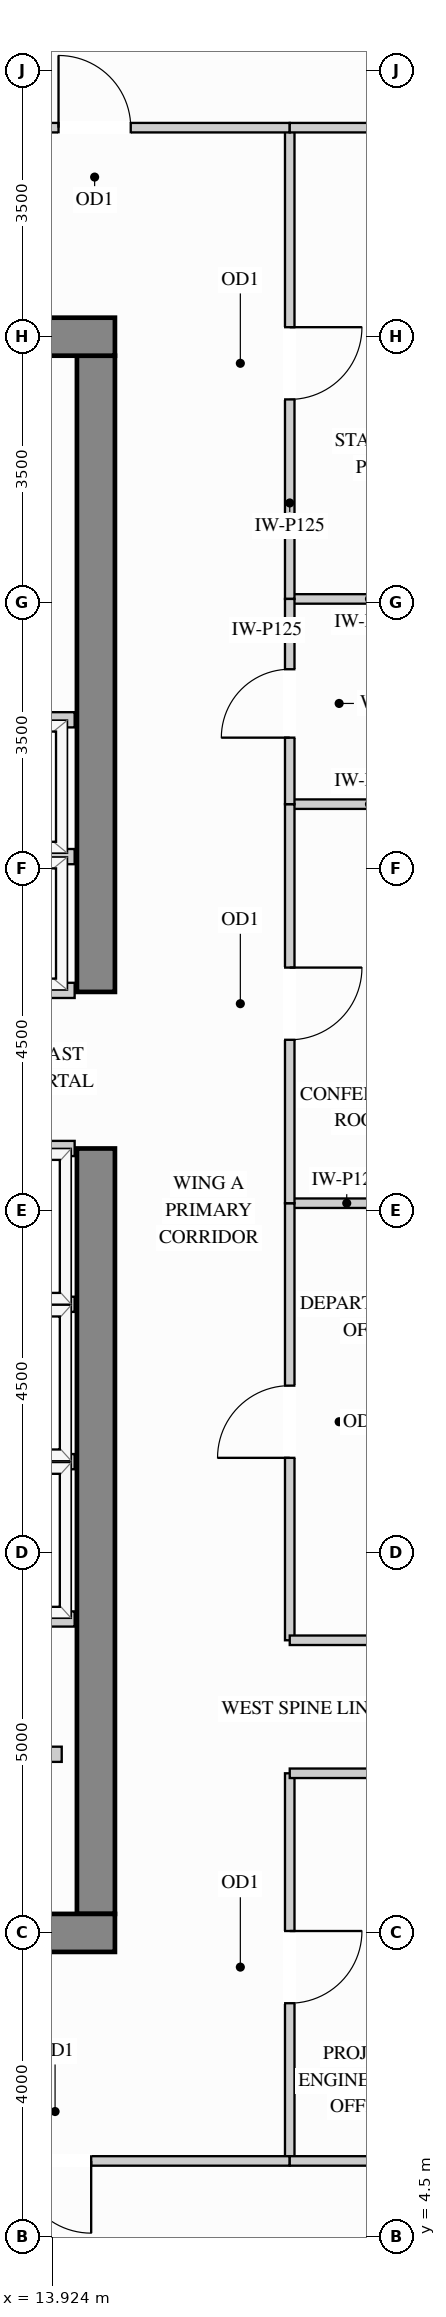
"""IFC4 building model, lengths in metres.
Left out: names, types, materials, properties, quantities, classifications, styles, units other than length and angle.
Written with IfcOpenShell. Run it as: python <this file> out.ifc"""

import sys

from ifc_helpers import new_model, si_unit, direction, frame, frame_2d, origin, place, context, subcontext, project, spatial, rectangle, extrude, source, transform, mapped, element, fill, save


model = new_model("IFC4")
c1 = context("Model", 3, precision=1e-05, world=origin(), true_north=direction((0.0, 1.0)))
c2 = subcontext(c1, "Body", "Model", "MODEL_VIEW")
j1 = project(units=[si_unit("LENGTHUNIT", "METRE"), si_unit("PLANEANGLEUNIT", "RADIAN")], contexts=[c1])
p1 = place(None, origin())
s1 = spatial("IfcSite", under=j1, at=p1, CompositionType="ELEMENT")
p2 = place(p1, origin())
s2 = spatial("IfcBuilding", under=s1, at=p2, CompositionType="ELEMENT")
p3 = place(p2, frame((0.0, 0.0, 216.0)))
s3 = spatial("IfcBuildingStorey", under=s2, at=p3, CompositionType="ELEMENT", Elevation=216.0)
m1 = source(origin(), c2, "Body", "SweptSolid", [
    extrude(rectangle(XDim=10.07, YDim=0.5, at=frame_2d((5.035, 0.0))), origin(), (0.0, 0.0, 1.0), 3.4),
])
p4 = place(p3, frame((14.5, 8.75, 0.0), z_axis=(0.0, 0.0, 1.0), x_axis=(0.0, 1.0, 0.0)))
e1 = element("IfcWall", 1, at=p4, inside=s3, PredefinedType="SHEAR", context=c2, shape_type="MappedRepresentation", body=[
    mapped(m1, transform((0.0, 0.0, 0.0), x_axis=(1.0, 0.0, 0.0), y_axis=(0.0, 1.0, 0.0), z_axis=(0.0, 0.0, 1.0))),
])
m2 = source(origin(), c2, "Body", "SweptSolid", [
    extrude(rectangle(XDim=8.37, YDim=0.5, at=frame_2d((4.185, 0.0))), origin(), (0.0, 0.0, 1.0), 3.4),
])
p5 = place(p3, frame((14.5, 20.88, 0.0), z_axis=(0.0, 0.0, 1.0), x_axis=(0.0, 1.0, 0.0)))
e2 = element("IfcWall", 2, at=p5, inside=s3, PredefinedType="SHEAR", context=c2, shape_type="MappedRepresentation", body=[
    mapped(m2, transform((0.0, 0.0, 0.0), x_axis=(1.0, 0.0, 0.0), y_axis=(0.0, 1.0, 0.0), z_axis=(0.0, 0.0, 1.0))),
])
m3 = source(origin(), c2, "Body", "SweptSolid", [
    extrude(rectangle(XDim=10.5, YDim=0.5, at=frame_2d((5.25, 0.0))), origin(), (0.0, 0.0, 1.0), 3.4),
])
for number, where, z_axis, x_axis in (
    (3, (4.25, 29.5, 0.0), (0.0, 0.0, 1.0), (1.0, 0.0, 0.0)),
    (4, (4.25, 8.5, 0.0), (0.0, 0.0, 1.0), (1.0, 0.0, 0.0)),
):
    element("IfcWall", number, at=place(p3, frame(where, z_axis=z_axis, x_axis=x_axis)), inside=s3, PredefinedType="SHEAR", context=c2, shape_type="MappedRepresentation", body=[
        mapped(m3, transform((0.0, 0.0, 0.0), x_axis=(1.0, 0.0, 0.0), y_axis=(0.0, 1.0, 0.0), z_axis=(0.0, 0.0, 1.0))),
    ])
m4 = source(origin(), c2, "Body", "SweptSolid", [
    extrude(rectangle(XDim=1.5, YDim=0.125, at=frame_2d((0.75, 0.0))), origin(), (0.0, 0.0, 1.0), 2.773),
])
p6 = place(p3, frame((17.05, 18.1, 0.0), z_axis=(0.0, 0.0, 1.0), x_axis=(1.0, 0.0, 0.0)))
e5 = element("IfcWall", 5, at=p6, inside=s3, PredefinedType="PARTITIONING", context=c2, shape_type="MappedRepresentation", body=[
    mapped(m4, transform((0.0, 0.0, 0.0), x_axis=(1.0, 0.0, 0.0), y_axis=(0.0, 1.0, 0.0), z_axis=(0.0, 0.0, 1.0))),
])
m5 = source(origin(), c2, "Body", "SweptSolid", [
    extrude(rectangle(XDim=2.098, YDim=0.125, at=frame_2d((1.049, 0.0))), origin(), (0.0, 0.0, 1.0), 3.385),
])
for number, where, z_axis, x_axis in (
    (6, (17.05, 23.35, 0.0), (0.0, 0.0, 1.0), (1.0, 0.0, 0.0)),
    (7, (17.05, 26.05, 0.0), (0.0, 0.0, 1.0), (1.0, 0.0, 0.0)),
):
    element("IfcWall", number, at=place(p3, frame(where, z_axis=z_axis, x_axis=x_axis)), inside=s3, PredefinedType="PARTITIONING", context=c2, shape_type="MappedRepresentation", body=[
        mapped(m5, transform((0.0, 0.0, 0.0), x_axis=(1.0, 0.0, 0.0), y_axis=(0.0, 1.0, 0.0), z_axis=(0.0, 0.0, 1.0))),
    ])
p7 = place(p3, frame((17.05, 12.35, 0.0), z_axis=(0.0, 0.0, 1.0), x_axis=(0.0, 1.0, 0.0)))
e8 = element("IfcWall", 8, at=p7, inside=s3, PredefinedType="PARTITIONING", context=c2, shape_type="SweptSolid", body=[
    extrude(rectangle(XDim=5.75, YDim=0.125, at=frame_2d((2.875, 0.0))), origin(), (0.0, 0.0, 1.0), 3.385),
])
p8 = place(p7, frame((2.4, 0.0, 0.0)))
e9 = element("IfcOpeningElement", 9, at=p8, cuts=e8, PredefinedType="OPENING", context=c2, shape_type="SweptSolid", body=[
    extrude(rectangle(XDim=0.95, YDim=2.15, at=frame_2d((0.475, 1.075))), frame((0.0, 0.073, 0.0), z_axis=(0.0, -1.0, 0.0), x_axis=(1.0, 0.0, 0.0)), (0.0, 0.0, 1.0), 0.145),
])
p9 = place(p3, frame((17.05, 18.1, 0.0), z_axis=(0.0, 0.0, 1.0), x_axis=(0.0, 1.0, 0.0)))
e10 = element("IfcWall", 10, at=p9, inside=s3, PredefinedType="PARTITIONING", context=c2, shape_type="SweptSolid", body=[
    extrude(rectangle(XDim=5.25, YDim=0.125, at=frame_2d((2.625, 0.0))), origin(), (0.0, 0.0, 1.0), 3.385),
])
p10 = place(p9, frame((2.15, 0.0, 0.0)))
e11 = element("IfcOpeningElement", 11, at=p10, cuts=e10, PredefinedType="OPENING", context=c2, shape_type="SweptSolid", body=[
    extrude(rectangle(XDim=0.95, YDim=2.15, at=frame_2d((0.475, 1.075))), frame((0.0, 0.073, 0.0), z_axis=(0.0, -1.0, 0.0), x_axis=(1.0, 0.0, 0.0)), (0.0, 0.0, 1.0), 0.145),
])
p11 = place(p3, frame((17.05, 26.05, 0.0), z_axis=(0.0, 0.0, 1.0), x_axis=(0.0, 1.0, 0.0)))
e12 = element("IfcWall", 12, at=p11, inside=s3, PredefinedType="PARTITIONING", context=c2, shape_type="SweptSolid", body=[
    extrude(rectangle(XDim=6.2, YDim=0.125, at=frame_2d((3.1, 0.0))), origin(), (0.0, 0.0, 1.0), 3.385),
])
p12 = place(p11, frame((2.625, 0.0, 0.0)))
e13 = element("IfcOpeningElement", 13, at=p12, cuts=e12, PredefinedType="OPENING", context=c2, shape_type="SweptSolid", body=[
    extrude(rectangle(XDim=0.95, YDim=2.15, at=frame_2d((0.475, 1.075))), frame((0.0, 0.073, 0.0), z_axis=(0.0, -1.0, 0.0), x_axis=(1.0, 0.0, 0.0)), (0.0, 0.0, 1.0), 0.145),
])
p13 = place(p3, frame((17.05, 5.5, 0.0), z_axis=(0.0, 0.0, 1.0), x_axis=(0.0, 1.0, 0.0)))
e14 = element("IfcWall", 14, at=p13, inside=s3, PredefinedType="PARTITIONING", context=c2, shape_type="SweptSolid", body=[
    extrude(rectangle(XDim=5.1, YDim=0.125, at=frame_2d((2.55, 0.0))), origin(), (0.0, 0.0, 1.0), 3.385),
])
p14 = place(p13, frame((2.075, 0.0, 0.0)))
e15 = element("IfcOpeningElement", 15, at=p14, cuts=e14, PredefinedType="OPENING", context=c2, shape_type="SweptSolid", body=[
    extrude(rectangle(XDim=0.95, YDim=2.15, at=frame_2d((0.475, 1.075))), frame((0.0, 0.073, 0.0), z_axis=(0.0, -1.0, 0.0), x_axis=(1.0, 0.0, 0.0)), (0.0, 0.0, 1.0), 0.145),
])
p15 = place(p3, frame((17.05, 23.35, 0.0), z_axis=(0.0, 0.0, 1.0), x_axis=(0.0, 1.0, 0.0)))
e16 = element("IfcWall", 16, at=p15, inside=s3, PredefinedType="PARTITIONING", context=c2, shape_type="SweptSolid", body=[
    extrude(rectangle(XDim=2.7, YDim=0.125, at=frame_2d((1.35, 0.0))), origin(), (0.0, 0.0, 1.0), 3.385),
])
p16 = place(p15, frame((0.875, 0.0, 0.0)))
e17 = element("IfcOpeningElement", 17, at=p16, cuts=e16, PredefinedType="OPENING", context=c2, shape_type="SweptSolid", body=[
    extrude(rectangle(XDim=0.9, YDim=2.15, at=frame_2d((0.45, 1.075))), frame((0.0, 0.073, 0.0), z_axis=(0.0, -1.0, 0.0), x_axis=(1.0, 0.0, 0.0)), (0.0, 0.0, 1.0), 0.145),
])
p17 = place(p3, frame((11.916, 32.25, 0.0), z_axis=(0.0, 0.0, 1.0), x_axis=(1.0, 0.0, 0.0)))
e18 = element("IfcWall", 18, at=p17, inside=s3, PredefinedType="PARTITIONING", context=c2, shape_type="SweptSolid", body=[
    extrude(rectangle(XDim=5.134, YDim=0.125, at=frame_2d((2.567, 0.0))), origin(), (0.0, 0.0, 1.0), 3.385),
])
p18 = place(p17, frame((2.092, 0.0, 0.0)))
e19 = element("IfcOpeningElement", 19, at=p18, cuts=e18, PredefinedType="OPENING", context=c2, shape_type="SweptSolid", body=[
    extrude(rectangle(XDim=0.95, YDim=2.15, at=frame_2d((0.475, 1.075))), frame((0.0, 0.073, 0.0), z_axis=(0.0, -1.0, 0.0), x_axis=(1.0, 0.0, 0.0)), (0.0, 0.0, 1.0), 0.145),
])
p19 = place(p3, frame((17.05, 32.25, 0.0), z_axis=(0.0, 0.0, 1.0), x_axis=(1.0, 0.0, 0.0)))
e20 = element("IfcWall", 20, at=p19, inside=s3, PredefinedType="PARTITIONING", context=c2, shape_type="MappedRepresentation", body=[
    mapped(m5, transform((0.0, 0.0, 0.0), x_axis=(1.0, 0.0, 0.0), y_axis=(0.0, 1.0, 0.0), z_axis=(0.0, 0.0, 1.0))),
])
m6 = source(origin(), c2, "Body", "SweptSolid", [
    extrude(rectangle(XDim=2.45, YDim=0.125, at=frame_2d((1.225, 0.0))), origin(), (0.0, 0.0, 1.0), 3.385),
])
for number, where, z_axis, x_axis in (
    (21, (17.05, 12.35, 0.0), (0.0, 0.0, 1.0), (1.0, 0.0, 0.0)),
    (22, (17.05, 10.6, 0.0), (0.0, 0.0, 1.0), (1.0, 0.0, 0.0)),
):
    element("IfcWall", number, at=place(p3, frame(where, z_axis=z_axis, x_axis=x_axis)), inside=s3, PredefinedType="PARTITIONING", context=c2, shape_type="MappedRepresentation", body=[
        mapped(m6, transform((0.0, 0.0, 0.0), x_axis=(1.0, 0.0, 0.0), y_axis=(0.0, 1.0, 0.0), z_axis=(0.0, 0.0, 1.0))),
    ])
p20 = place(p3, frame((10.875, 5.5, 0.0), z_axis=(0.0, 0.0, 1.0), x_axis=(1.0, 0.0, 0.0)))
e23 = element("IfcWall", 23, at=p20, inside=s3, PredefinedType="PARTITIONING", context=c2, shape_type="SweptSolid", body=[
    extrude(rectangle(XDim=6.175, YDim=0.125, at=frame_2d((3.087, 0.0))), origin(), (0.0, 0.0, 1.0), 3.385),
])
p21 = place(p20, frame((2.613, 0.0, 0.0)))
e24 = element("IfcOpeningElement", 24, at=p21, cuts=e23, PredefinedType="OPENING", context=c2, shape_type="SweptSolid", body=[
    extrude(rectangle(XDim=0.95, YDim=2.15, at=frame_2d((0.475, 1.075))), frame((0.0, 0.073, 0.0), z_axis=(0.0, -1.0, 0.0), x_axis=(1.0, 0.0, 0.0)), (0.0, 0.0, 1.0), 0.145),
])
m7 = source(origin(), c2, "Body", "SweptSolid", [
    extrude(rectangle(XDim=2.1, YDim=0.125, at=frame_2d((1.05, 0.0))), origin(), (0.0, 0.0, 1.0), 3.385),
])
p22 = place(p3, frame((17.05, 5.5, 0.0), z_axis=(0.0, 0.0, 1.0), x_axis=(1.0, 0.0, 0.0)))
e25 = element("IfcWall", 25, at=p22, inside=s3, PredefinedType="PARTITIONING", context=c2, shape_type="MappedRepresentation", body=[
    mapped(m7, transform((0.0, 0.0, 0.0), x_axis=(1.0, 0.0, 0.0), y_axis=(0.0, 1.0, 0.0), z_axis=(0.0, 0.0, 1.0))),
])
m8 = source(origin(), c2, "Body", "SweptSolid", [
    extrude(rectangle(XDim=1.63, YDim=0.2, at=frame_2d((0.815, 0.0))), origin(), (0.0, 0.0, 1.0), 3.385),
])
p23 = place(p3, frame((12.42, 10.85, 0.0), z_axis=(0.0, 0.0, 1.0), x_axis=(1.0, 0.0, 0.0)))
e26 = element("IfcWall", 26, at=p23, inside=s3, PredefinedType="PARTITIONING", context=c2, shape_type="MappedRepresentation", body=[
    mapped(m8, transform((0.0, 0.0, 0.0), x_axis=(1.0, 0.0, 0.0), y_axis=(0.0, 1.0, 0.0), z_axis=(0.0, 0.0, 1.0))),
])
m9 = source(origin(), c2, "Body", "SweptSolid", [
    extrude(rectangle(XDim=2.39, YDim=0.2, at=frame_2d((1.195, 0.0))), origin(), (0.0, 0.0, 1.0), 3.385),
])
for number, where, z_axis, x_axis in (
    (27, (11.83, 22.66, 0.0), (0.0, 0.0, 1.0), (1.0, 0.0, 0.0)),
    (28, (11.83, 20.9, 0.0), (0.0, 0.0, 1.0), (1.0, 0.0, 0.0)),
    (29, (11.83, 24.46, 0.0), (0.0, 0.0, 1.0), (1.0, 0.0, 0.0)),
):
    element("IfcWall", number, at=place(p3, frame(where, z_axis=z_axis, x_axis=x_axis)), inside=s3, PredefinedType="PARTITIONING", context=c2, shape_type="MappedRepresentation", body=[
        mapped(m9, transform((0.0, 0.0, 0.0), x_axis=(1.0, 0.0, 0.0), y_axis=(0.0, 1.0, 0.0), z_axis=(0.0, 0.0, 1.0))),
    ])
m10 = source(origin(), c2, "Body", "SweptSolid", [
    extrude(rectangle(XDim=1.99, YDim=0.2, at=frame_2d((0.995, 0.0))), origin(), (0.0, 0.0, 1.0), 3.385),
])
for number, where, z_axis, x_axis in (
    (30, (12.23, 14.7, 0.0), (0.0, 0.0, 1.0), (1.0, 0.0, 0.0)),
    (31, (12.23, 12.63, 0.0), (0.0, 0.0, 1.0), (1.0, 0.0, 0.0)),
    (32, (12.23, 16.77, 0.0), (0.0, 0.0, 1.0), (1.0, 0.0, 0.0)),
    (33, (12.23, 18.82, 0.0), (0.0, 0.0, 1.0), (1.0, 0.0, 0.0)),
):
    element("IfcWall", number, at=place(p3, frame(where, z_axis=z_axis, x_axis=x_axis)), inside=s3, PredefinedType="PARTITIONING", context=c2, shape_type="MappedRepresentation", body=[
        mapped(m10, transform((0.0, 0.0, 0.0), x_axis=(1.0, 0.0, 0.0), y_axis=(0.0, 1.0, 0.0), z_axis=(0.0, 0.0, 1.0))),
    ])
m11 = source(origin(), c2, "Body", "SweptSolid", [
    extrude(rectangle(XDim=0.95, YDim=2.15, at=frame_2d((0.475, 1.075))), frame((0.0, 0.025, 0.0), z_axis=(0.0, -1.0, 0.0), x_axis=(1.0, 0.0, 0.0)), (0.0, 0.0, 1.0), 0.05),
])
p24 = place(p14, origin())
e34 = element("IfcDoor", 34, at=p24, inside=s3, OperationType="SINGLE_SWING_RIGHT", PredefinedType="DOOR", context=c2, shape_type="MappedRepresentation", body=[
    mapped(m11, transform((0.0, 0.0, 0.0), x_axis=(1.0, 0.0, 0.0), y_axis=(0.0, 1.0, 0.0), z_axis=(0.0, 0.0, 1.0))),
])
fill(e15, e34)
p25 = place(p8, origin())
e35 = element("IfcDoor", 35, at=p25, inside=s3, OperationType="SINGLE_SWING_LEFT", PredefinedType="DOOR", context=c2, shape_type="MappedRepresentation", body=[
    mapped(m11, transform((0.0, 0.0, 0.0), x_axis=(1.0, 0.0, 0.0), y_axis=(0.0, 1.0, 0.0), z_axis=(0.0, 0.0, 1.0))),
])
fill(e9, e35)
p26 = place(p10, origin())
e36 = element("IfcDoor", 36, at=p26, inside=s3, OperationType="SINGLE_SWING_RIGHT", PredefinedType="DOOR", context=c2, shape_type="MappedRepresentation", body=[
    mapped(m11, transform((0.0, 0.0, 0.0), x_axis=(1.0, 0.0, 0.0), y_axis=(0.0, 1.0, 0.0), z_axis=(0.0, 0.0, 1.0))),
])
fill(e11, e36)
p27 = place(p12, origin())
e37 = element("IfcDoor", 37, at=p27, inside=s3, OperationType="SINGLE_SWING_RIGHT", PredefinedType="DOOR", context=c2, shape_type="MappedRepresentation", body=[
    mapped(m11, transform((0.0, 0.0, 0.0), x_axis=(1.0, 0.0, 0.0), y_axis=(0.0, 1.0, 0.0), z_axis=(0.0, 0.0, 1.0))),
])
fill(e13, e37)
p28 = place(p18, origin())
e38 = element("IfcDoor", 38, at=p28, inside=s3, OperationType="SINGLE_SWING_LEFT", PredefinedType="DOOR", context=c2, shape_type="MappedRepresentation", body=[
    mapped(m11, transform((0.0, 0.0, 0.0), x_axis=(1.0, 0.0, 0.0), y_axis=(0.0, 1.0, 0.0), z_axis=(0.0, 0.0, 1.0))),
])
fill(e19, e38)
p29 = place(p21, origin())
e39 = element("IfcDoor", 39, at=p29, inside=s3, OperationType="SINGLE_SWING_RIGHT", PredefinedType="DOOR", context=c2, shape_type="MappedRepresentation", body=[
    mapped(m11, transform((0.0, 0.0, 0.0), x_axis=(1.0, 0.0, 0.0), y_axis=(0.0, 1.0, 0.0), z_axis=(0.0, 0.0, 1.0))),
])
fill(e24, e39)
m12 = source(origin(), c2, "Body", "SweptSolid", [
    extrude(rectangle(XDim=0.9, YDim=2.15, at=frame_2d((0.45, 1.075))), frame((0.0, 0.025, 0.0), z_axis=(0.0, -1.0, 0.0), x_axis=(1.0, 0.0, 0.0)), (0.0, 0.0, 1.0), 0.05),
])
p30 = place(p16, origin())
e40 = element("IfcDoor", 40, at=p30, inside=s3, OperationType="SINGLE_SWING_LEFT", PredefinedType="DOOR", context=c2, shape_type="MappedRepresentation", body=[
    mapped(m12, transform((0.0, 0.0, 0.0), x_axis=(1.0, 0.0, 0.0), y_axis=(0.0, 1.0, 0.0), z_axis=(0.0, 0.0, 1.0))),
])
fill(e17, e40)
save(model, sys.argv[1])
